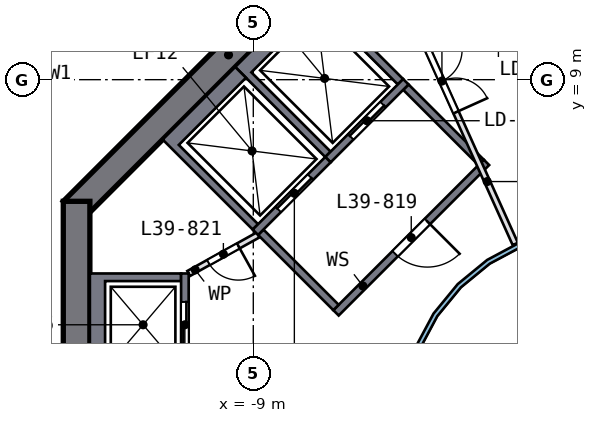
"""IFC4 building model, lengths in metres.
Left out: names, types, materials, properties, quantities, classifications, styles, units other than length and angle.
Written with IfcOpenShell. Run it as: python <this file> out.ifc"""

import sys

from ifc_helpers import new_model, si_unit, direction, frame, frame_2d, origin, place, context, subcontext, project, spatial, polyline, rectangle, outline, extrude, element, fill, save


model = new_model("IFC4")
c1 = context("Model", 3, precision=1e-05, world=origin(), true_north=direction((0.0, 1.0)))
c2 = subcontext(c1, "Body", "Model", "MODEL_VIEW")
j1 = project(units=[si_unit("LENGTHUNIT", "METRE"), si_unit("PLANEANGLEUNIT", "RADIAN")], contexts=[c1])
p1 = place(None, origin())
s1 = spatial("IfcSite", under=j1, at=p1, CompositionType="ELEMENT")
p2 = place(p1, origin())
s2 = spatial("IfcBuilding", under=s1, at=p2, CompositionType="ELEMENT")
p3 = place(p2, frame((0.0, 0.0, 162.0)))
s3 = spatial("IfcBuildingStorey", under=s2, at=p3, CompositionType="ELEMENT", Elevation=162.0)
p4 = place(p3, frame((-5.552, 13.752, 0.0), z_axis=(0.0, 0.0, 1.0), x_axis=(-0.707106781, -0.707106781, 0.0)))
e1 = element("IfcWall", 1, at=p4, inside=s3, PredefinedType="SHEAR", context=c2, shape_type="SweptSolid", body=[
    extrude(rectangle(XDim=11.598, YDim=0.7, at=frame_2d((5.799, 0.0))), origin(), (0.0, 0.0, 1.0), 3.5),
])
p5 = place(p3, frame((-13.65, 5.799, 0.0), z_axis=(0.0, 0.0, 1.0), x_axis=(0.0, -1.0, 0.0)))
e2 = element("IfcWall", 2, at=p5, inside=s3, PredefinedType="SHEAR", context=c2, shape_type="SweptSolid", body=[
    extrude(rectangle(XDim=11.598, YDim=0.7, at=frame_2d((5.799, 0.0))), origin(), (0.0, 0.0, 1.0), 3.5),
])
p6 = place(p5, frame((4.899, 0.0, 0.0)))
e3 = element("IfcOpeningElement", 3, at=p6, cuts=e2, PredefinedType="OPENING", context=c2, shape_type="SweptSolid", body=[
    extrude(rectangle(XDim=1.8, YDim=2.1, at=frame_2d((0.9, 1.05))), frame((0.0, 0.36, 0.0), z_axis=(0.0, -1.0, 0.0), x_axis=(1.0, 0.0, 0.0)), (0.0, 0.0, 1.0), 0.72),
])
p7 = place(p3, origin())
e4 = element("IfcWall", 4, at=p7, inside=s3, PredefinedType="SOLIDWALL", context=c2, shape_type="SweptSolid", body=[
    extrude(outline(polyline([(-13.3, 3.9), (-10.9, 3.9), (-10.9, 3.7), (-12.9, 3.7), (-12.9, 1.4), (-10.9, 1.4), (-10.9, 1.2), (-13.3, 1.2), (-13.3, 3.9)])), origin(), (0.0, 0.0, 1.0), 3.19),
])
p8 = place(p3, frame((-10.8, 1.2, 0.0), z_axis=(0.0, 0.0, 1.0), x_axis=(0.0, 1.0, 0.0)))
e5 = element("IfcWall", 5, at=p8, inside=s3, PredefinedType="SOLIDWALL", context=c2, shape_type="SweptSolid", body=[
    extrude(rectangle(XDim=2.7, YDim=0.2, at=frame_2d((1.35, 0.0))), origin(), (0.0, 0.0, 1.0), 3.19),
])
p9 = place(p8, frame((0.75, 0.0, 0.0)))
e6 = element("IfcOpeningElement", 6, at=p9, cuts=e5, PredefinedType="OPENING", context=c2, shape_type="SweptSolid", body=[
    extrude(rectangle(XDim=1.2, YDim=2.1, at=frame_2d((0.6, 1.05))), frame((0.0, 0.11, 0.0), z_axis=(0.0, -1.0, 0.0), x_axis=(1.0, 0.0, 0.0)), (0.0, 0.0, 1.0), 0.22),
])
p10 = place(p3, origin())
e7 = element("IfcWall", 7, at=p10, inside=s3, PredefinedType="SOLIDWALL", context=c2, shape_type="SweptSolid", body=[
    extrude(outline(polyline([(-9.475, 9.334), (-7.425, 11.385), (-5.056, 9.016), (-5.197, 8.874), (-7.283, 10.96), (-9.051, 9.192), (-6.965, 7.106), (-7.106, 6.965), (-9.475, 9.334)])), origin(), (0.0, 0.0, 1.0), 3.19),
])
p11 = place(p3, frame((-4.985, 8.945, 0.0), z_axis=(0.0, 0.0, 1.0), x_axis=(-0.707106781, -0.707106781, 0.0)))
e8 = element("IfcWall", 8, at=p11, inside=s3, PredefinedType="SOLIDWALL", context=c2, shape_type="SweptSolid", body=[
    extrude(rectangle(XDim=2.9, YDim=0.2, at=frame_2d((1.45, 0.0))), origin(), (0.0, 0.0, 1.0), 3.19),
])
p12 = place(p11, frame((0.85, 0.0, 0.0)))
e9 = element("IfcOpeningElement", 9, at=p12, cuts=e8, PredefinedType="OPENING", context=c2, shape_type="SweptSolid", body=[
    extrude(rectangle(XDim=1.2, YDim=2.1, at=frame_2d((0.6, 1.05))), frame((0.0, 0.11, 0.0), z_axis=(0.0, -1.0, 0.0), x_axis=(1.0, 0.0, 0.0)), (0.0, 0.0, 1.0), 0.22),
])
p13 = place(p3, origin())
e10 = element("IfcWall", 10, at=p13, inside=s3, PredefinedType="SOLIDWALL", context=c2, shape_type="SweptSolid", body=[
    extrude(outline(polyline([(-11.385, 7.425), (-9.475, 9.334), (-9.192, 9.051), (-10.96, 7.283), (-8.874, 5.197), (-9.016, 5.056), (-11.385, 7.425)])), origin(), (0.0, 0.0, 1.0), 3.19),
])
p14 = place(p3, frame((-7.036, 6.894, 0.0), z_axis=(0.0, 0.0, 1.0), x_axis=(-0.707106781, -0.707106781, 0.0)))
e11 = element("IfcWall", 11, at=p14, inside=s3, PredefinedType="SOLIDWALL", context=c2, shape_type="SweptSolid", body=[
    extrude(rectangle(XDim=2.7, YDim=0.2, at=frame_2d((1.35, 0.0))), origin(), (0.0, 0.0, 1.0), 3.19),
])
p15 = place(p14, frame((0.65, 0.0, 0.0)))
e12 = element("IfcOpeningElement", 12, at=p15, cuts=e11, PredefinedType="OPENING", context=c2, shape_type="SweptSolid", body=[
    extrude(rectangle(XDim=1.2, YDim=2.1, at=frame_2d((0.6, 1.05))), frame((0.0, 0.11, 0.0), z_axis=(0.0, -1.0, 0.0), x_axis=(1.0, 0.0, 0.0)), (0.0, 0.0, 1.0), 0.22),
])
p16 = place(p3, frame((-2.864, 6.823, 0.0), z_axis=(0.0, 0.0, 1.0), x_axis=(-0.707106781, -0.707106781, 0.0)))
e13 = element("IfcWall", 13, at=p16, inside=s3, PredefinedType="SOLIDWALL", context=c2, shape_type="SweptSolid", body=[
    extrude(rectangle(XDim=5.6, YDim=0.2, at=frame_2d((2.8, 0.0))), origin(), (0.0, 0.0, 1.0), 3.19),
])
p17 = place(p16, frame((2.2, 0.0, 0.0)))
e14 = element("IfcOpeningElement", 14, at=p17, cuts=e13, PredefinedType="OPENING", context=c2, shape_type="SweptSolid", body=[
    extrude(rectangle(XDim=1.2, YDim=2.1, at=frame_2d((0.6, 1.05))), frame((0.0, 0.11, 0.0), z_axis=(0.0, -1.0, 0.0), x_axis=(1.0, 0.0, 0.0)), (0.0, 0.0, 1.0), 0.22),
])
for number, where, z_axis, x_axis in (
    (15, (-3.005, 6.823, 0.0), (0.0, 0.0, 1.0), (-0.707, 0.707, 0.0)),
    (16, (-6.823, 3.005, 0.0), (0.0, 0.0, 1.0), (-0.707, 0.707, 0.0)),
):
    element("IfcWall", number, at=place(p3, frame(where, z_axis=z_axis, x_axis=x_axis)), inside=s3, PredefinedType="SOLIDWALL", context=c2, shape_type="SweptSolid", body=[
        extrude(rectangle(XDim=2.8, YDim=0.2, at=frame_2d((1.4, 0.0))), origin(), (0.0, 0.0, 1.0), 3.19),
    ])
p18 = place(p3, frame((-8.874, 4.914, 0.0), z_axis=(0.0, 0.0, 1.0), x_axis=(-0.874129705, -0.485692555, 0.0)))
e17 = element("IfcWall", 17, at=p18, inside=s3, PredefinedType="PARTITIONING", context=c2, shape_type="SweptSolid", body=[
    extrude(rectangle(XDim=2.089, YDim=0.15, at=frame_2d((1.044, 0.0))), origin(), (0.0, 0.0, 1.0), 3.19),
])
p19 = place(p18, frame((0.594, 0.0, 0.0)))
e18 = element("IfcOpeningElement", 18, at=p19, cuts=e17, PredefinedType="OPENING", context=c2, shape_type="SweptSolid", body=[
    extrude(rectangle(XDim=0.9, YDim=2.1, at=frame_2d((0.45, 1.05))), frame((0.0, 0.085, 0.0), z_axis=(0.0, -1.0, 0.0), x_axis=(1.0, 0.0, 0.0)), (0.0, 0.0, 1.0), 0.17),
])
p20 = place(p3, frame((-5.828, 12.942, 0.0), z_axis=(0.0, 0.0, 1.0), x_axis=(0.410577476, -0.911825716, 0.0)))
e19 = element("IfcWall", 19, at=p20, inside=s3, PredefinedType="PARTITIONING", context=c2, shape_type="SweptSolid", body=[
    extrude(rectangle(XDim=9.063, YDim=0.15, at=frame_2d((4.532, 0.0))), origin(), (0.0, 0.0, 1.0), 3.19),
])
p21 = place(p20, frame((3.463, 0.0, 0.0)))
e20 = element("IfcOpeningElement", 20, at=p21, cuts=e19, PredefinedType="OPENING", context=c2, shape_type="SweptSolid", body=[
    extrude(rectangle(XDim=1.8, YDim=2.1, at=frame_2d((0.9, 1.05))), frame((0.0, 0.085, 0.0), z_axis=(0.0, -1.0, 0.0), x_axis=(1.0, 0.0, 0.0)), (0.0, 0.0, 1.0), 0.17),
])
p22 = place(p3, origin())
e21 = element("IfcWall", 21, at=p22, inside=s3, PredefinedType="SOLIDWALL", context=c2, shape_type="SweptSolid", body=[
    extrude(outline(polyline([(5.021, -0.999), (4.73, -1.959), (4.257, -2.844), (3.62, -3.62), (2.844, -4.257), (1.959, -4.73), (0.999, -5.021), (0.0, -5.12), (-0.999, -5.021), (-1.959, -4.73), (-2.844, -4.257), (-3.62, -3.62), (-4.257, -2.844), (-4.73, -1.959), (-5.021, -0.999), (-5.12, 0.0), (-5.021, 0.999), (-4.73, 1.959), (-4.257, 2.844), (-3.62, 3.62), (-2.844, 4.257), (-1.959, 4.73), (-0.999, 5.021), (0.0, 5.12), (0.999, 5.021), (1.959, 4.73), (2.844, 4.257), (3.62, 3.62), (4.257, 2.844), (4.73, 1.959), (5.021, 0.999), (5.12, 0.0), (5.021, -0.999)]), holes=[polyline([(4.904, 0.976), (4.619, 1.913), (4.157, 2.778), (3.535, 3.535), (2.778, 4.157), (1.913, 4.619), (0.976, 4.904), (0.0, 5.0), (-0.976, 4.904), (-1.913, 4.619), (-2.778, 4.157), (-3.535, 3.535), (-4.157, 2.778), (-4.619, 1.913), (-4.904, 0.976), (-5.0, 0.0), (-4.904, -0.976), (-4.619, -1.913), (-4.157, -2.778), (-3.535, -3.535), (-2.778, -4.157), (-1.913, -4.619), (-0.976, -4.904), (0.0, -5.0), (0.976, -4.904), (1.913, -4.619), (2.778, -4.157), (3.535, -3.535), (4.157, -2.778), (4.619, -1.913), (4.904, -0.976), (5.0, 0.0), (4.904, 0.976)])]), origin(), (0.0, 0.0, 1.0), 3.19),
])
p23 = place(p3, frame((-17.89, 4.236, 0.0), z_axis=(0.0, 0.0, 1.0), x_axis=(0.474391993, 0.880313715, 0.0)))
e22 = element("IfcWall", 22, at=p23, inside=s3, PredefinedType="SOLIDWALL", context=c2, shape_type="SweptSolid", body=[
    extrude(rectangle(XDim=9.517, YDim=0.2, at=frame_2d((4.758, 0.0))), origin(), (0.0, 0.0, 1.0), 3.19),
])
p24 = place(p23, frame((1.9, 0.0, 0.0)))
e23 = element("IfcOpeningElement", 23, at=p24, cuts=e22, PredefinedType="OPENING", context=c2, shape_type="SweptSolid", body=[
    extrude(rectangle(XDim=1.0, YDim=2.1, at=frame_2d((0.5, 1.05))), frame((0.0, 0.11, 0.0), z_axis=(0.0, -1.0, 0.0), x_axis=(1.0, 0.0, 0.0)), (0.0, 0.0, 1.0), 0.22),
])
p25 = place(p9, origin())
e24 = element("IfcDoor", 24, at=p25, inside=s3, OperationType="DOUBLE_DOOR_SLIDING", PredefinedType="DOOR", context=c2, shape_type="SweptSolid", body=[
    extrude(rectangle(XDim=1.2, YDim=2.1, at=frame_2d((0.6, 1.05))), frame((0.0, 0.025, 0.0), z_axis=(0.0, -1.0, 0.0), x_axis=(1.0, 0.0, 0.0)), (0.0, 0.0, 1.0), 0.05),
])
fill(e6, e24)
p26 = place(p12, origin())
e25 = element("IfcDoor", 25, at=p26, inside=s3, OperationType="DOUBLE_DOOR_SLIDING", PredefinedType="DOOR", context=c2, shape_type="SweptSolid", body=[
    extrude(rectangle(XDim=1.2, YDim=2.1, at=frame_2d((0.6, 1.05))), frame((0.0, 0.025, 0.0), z_axis=(0.0, -1.0, 0.0), x_axis=(1.0, 0.0, 0.0)), (0.0, 0.0, 1.0), 0.05),
])
fill(e9, e25)
p27 = place(p15, origin())
e26 = element("IfcDoor", 26, at=p27, inside=s3, OperationType="DOUBLE_DOOR_SLIDING", PredefinedType="DOOR", context=c2, shape_type="SweptSolid", body=[
    extrude(rectangle(XDim=1.2, YDim=2.1, at=frame_2d((0.6, 1.05))), frame((0.0, 0.025, 0.0), z_axis=(0.0, -1.0, 0.0), x_axis=(1.0, 0.0, 0.0)), (0.0, 0.0, 1.0), 0.05),
])
fill(e12, e26)
p28 = place(p17, origin())
e27 = element("IfcDoor", 27, at=p28, inside=s3, OperationType="SINGLE_SWING_LEFT", PredefinedType="DOOR", context=c2, shape_type="SweptSolid", body=[
    extrude(rectangle(XDim=1.2, YDim=2.1, at=frame_2d((0.6, 1.05))), frame((0.0, 0.025, 0.0), z_axis=(0.0, -1.0, 0.0), x_axis=(1.0, 0.0, 0.0)), (0.0, 0.0, 1.0), 0.05),
])
fill(e14, e27)
p29 = place(p19, origin())
e28 = element("IfcDoor", 28, at=p29, inside=s3, OperationType="SINGLE_SWING_LEFT", PredefinedType="DOOR", context=c2, shape_type="SweptSolid", body=[
    extrude(rectangle(XDim=0.9, YDim=2.1, at=frame_2d((0.45, 1.05))), frame((0.0, 0.025, 0.0), z_axis=(0.0, -1.0, 0.0), x_axis=(1.0, 0.0, 0.0)), (0.0, 0.0, 1.0), 0.05),
])
fill(e18, e28)
p30 = place(p21, origin())
e29 = element("IfcDoor", 29, at=p30, inside=s3, OperationType="DOUBLE_DOOR_SINGLE_SWING", PredefinedType="DOOR", context=c2, shape_type="SweptSolid", body=[
    extrude(rectangle(XDim=1.8, YDim=2.1, at=frame_2d((0.9, 1.05))), frame((0.0, 0.025, 0.0), z_axis=(0.0, -1.0, 0.0), x_axis=(1.0, 0.0, 0.0)), (0.0, 0.0, 1.0), 0.05),
])
fill(e20, e29)
save(model, sys.argv[1])
